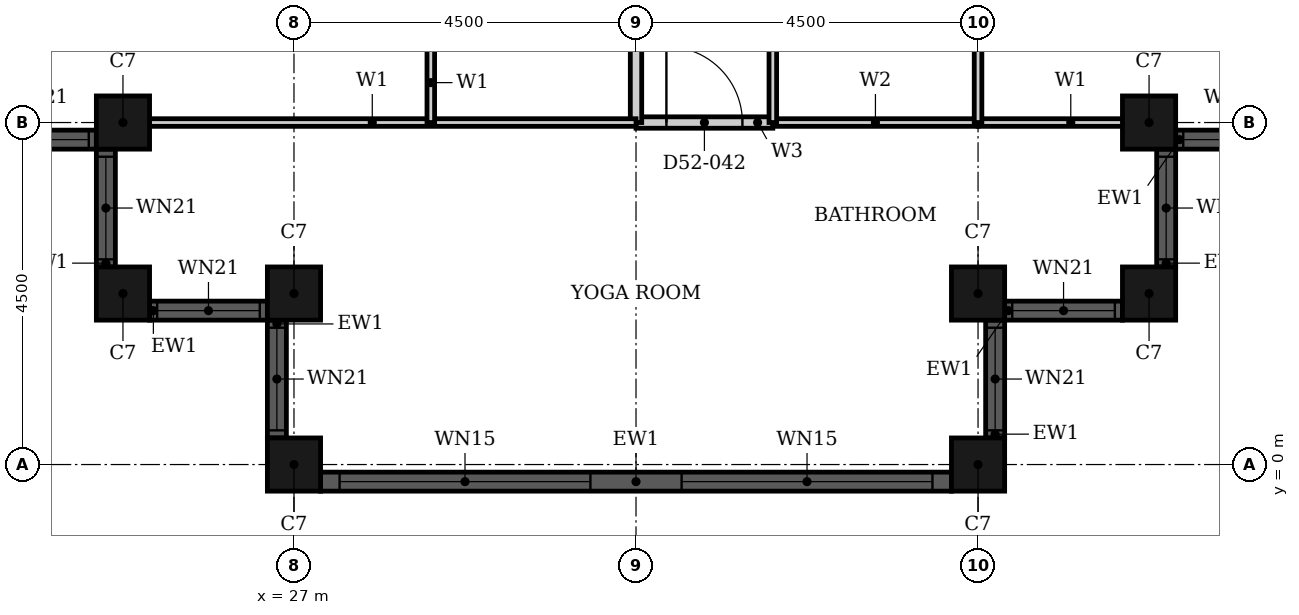
"""IFC4 building model, lengths in metres.
Left out: names, types, materials, properties, quantities, classifications, styles, units other than length and angle.
Written with IfcOpenShell. Run it as: python <this file> out.ifc"""

import sys

from ifc_helpers import new_model, si_unit, direction, frame, frame_2d, origin, origin_2d, place, context, subcontext, project, spatial, rectangle, hollow_rectangle, extrude, element, fill, save


model = new_model("IFC4")
c1 = context("Model", 3, precision=1e-05, world=origin(), true_north=direction((0.0, 1.0)))
c2 = subcontext(c1, "Body", "Model", "MODEL_VIEW")
j1 = project(units=[si_unit("LENGTHUNIT", "METRE"), si_unit("PLANEANGLEUNIT", "RADIAN")], contexts=[c1])
p1 = place(None, origin())
s1 = spatial("IfcSite", under=j1, at=p1, CompositionType="ELEMENT")
p2 = place(p1, origin())
s2 = spatial("IfcBuilding", under=s1, at=p2, CompositionType="ELEMENT")
p3 = place(p2, frame((0.0, 0.0, 207.2)))
s3 = spatial("IfcBuildingStorey", under=s2, at=p3, CompositionType="ELEMENT", Elevation=207.2)
for number, where, z_axis, x_axis in (
    (1, (24.75, 4.5, 0.0), (0.0, 0.0, 1.0), (1.0, 0.0, 0.0)),
    (2, (24.75, 2.25, 0.0), (0.0, 0.0, 1.0), (1.0, 0.0, 0.0)),
    (3, (27.0, 2.25, 0.0), (0.0, 0.0, 1.0), (1.0, 0.0, 0.0)),
    (4, (27.0, 0.0, 0.0), (0.0, 0.0, 1.0), (1.0, 0.0, 0.0)),
    (5, (36.0, 0.0, 0.0), (0.0, 0.0, 1.0), (1.0, 0.0, 0.0)),
    (6, (36.0, 2.25, 0.0), (0.0, 0.0, 1.0), (1.0, 0.0, 0.0)),
    (7, (38.25, 2.25, 0.0), (0.0, 0.0, 1.0), (1.0, 0.0, 0.0)),
    (8, (38.25, 4.5, 0.0), (0.0, 0.0, 1.0), (1.0, 0.0, 0.0)),
):
    element("IfcColumn", number, at=place(p3, frame(where, z_axis=z_axis, x_axis=x_axis)), inside=s3, PredefinedType="COLUMN", context=c2, shape_type="SweptSolid", body=[
        extrude(hollow_rectangle(XDim=0.7, YDim=0.7, WallThickness=0.022, at=origin_2d()), origin(), (0.0, 0.0, 1.0), 3.7),
    ])
p4 = place(p3, frame((22.85, 4.275, 0.0), z_axis=(0.0, 0.0, 1.0), x_axis=(1.0, 0.0, 0.0)))
e9 = element("IfcWall", 9, at=p4, inside=s3, PredefinedType="SOLIDWALL", context=c2, shape_type="SweptSolid", body=[
    extrude(rectangle(XDim=1.55, YDim=0.25, at=frame_2d((0.775, 0.0))), origin(), (0.0, 0.0, 1.0), 3.7),
])
p5 = place(p4, frame((0.1, 0.0, 0.9)))
e10 = element("IfcOpeningElement", 10, at=p5, cuts=e9, PredefinedType="OPENING", context=c2, shape_type="SweptSolid", body=[
    extrude(rectangle(XDim=1.35, YDim=1.85, at=frame_2d((0.675, 0.925))), frame((0.0, 0.135, 0.0), z_axis=(0.0, -1.0, 0.0), x_axis=(1.0, 0.0, 0.0)), (0.0, 0.0, 1.0), 0.27),
])
p6 = place(p3, frame((24.525, 4.15, 0.0), z_axis=(0.0, 0.0, 1.0), x_axis=(0.0, -1.0, 0.0)))
e11 = element("IfcWall", 11, at=p6, inside=s3, PredefinedType="SOLIDWALL", context=c2, shape_type="SweptSolid", body=[
    extrude(rectangle(XDim=1.55, YDim=0.25, at=frame_2d((0.775, 0.0))), origin(), (0.0, 0.0, 1.0), 3.7),
])
p7 = place(p6, frame((0.1, 0.0, 0.9)))
e12 = element("IfcOpeningElement", 12, at=p7, cuts=e11, PredefinedType="OPENING", context=c2, shape_type="SweptSolid", body=[
    extrude(rectangle(XDim=1.35, YDim=1.85, at=frame_2d((0.675, 0.925))), frame((0.0, 0.135, 0.0), z_axis=(0.0, -1.0, 0.0), x_axis=(1.0, 0.0, 0.0)), (0.0, 0.0, 1.0), 0.27),
])
p8 = place(p3, frame((25.1, 2.025, 0.0), z_axis=(0.0, 0.0, 1.0), x_axis=(1.0, 0.0, 0.0)))
e13 = element("IfcWall", 13, at=p8, inside=s3, PredefinedType="SOLIDWALL", context=c2, shape_type="SweptSolid", body=[
    extrude(rectangle(XDim=1.55, YDim=0.25, at=frame_2d((0.775, 0.0))), origin(), (0.0, 0.0, 1.0), 3.7),
])
p9 = place(p8, frame((0.1, 0.0, 0.9)))
e14 = element("IfcOpeningElement", 14, at=p9, cuts=e13, PredefinedType="OPENING", context=c2, shape_type="SweptSolid", body=[
    extrude(rectangle(XDim=1.35, YDim=1.85, at=frame_2d((0.675, 0.925))), frame((0.0, 0.135, 0.0), z_axis=(0.0, -1.0, 0.0), x_axis=(1.0, 0.0, 0.0)), (0.0, 0.0, 1.0), 0.27),
])
p10 = place(p3, frame((26.775, 1.9, 0.0), z_axis=(0.0, 0.0, 1.0), x_axis=(0.0, -1.0, 0.0)))
e15 = element("IfcWall", 15, at=p10, inside=s3, PredefinedType="SOLIDWALL", context=c2, shape_type="SweptSolid", body=[
    extrude(rectangle(XDim=1.55, YDim=0.25, at=frame_2d((0.775, 0.0))), origin(), (0.0, 0.0, 1.0), 3.7),
])
p11 = place(p10, frame((0.1, 0.0, 0.9)))
e16 = element("IfcOpeningElement", 16, at=p11, cuts=e15, PredefinedType="OPENING", context=c2, shape_type="SweptSolid", body=[
    extrude(rectangle(XDim=1.35, YDim=1.85, at=frame_2d((0.675, 0.925))), frame((0.0, 0.135, 0.0), z_axis=(0.0, -1.0, 0.0), x_axis=(1.0, 0.0, 0.0)), (0.0, 0.0, 1.0), 0.27),
])
p12 = place(p3, frame((27.35, -0.225, 0.0), z_axis=(0.0, 0.0, 1.0), x_axis=(1.0, 0.0, 0.0)))
e17 = element("IfcWall", 17, at=p12, inside=s3, PredefinedType="SOLIDWALL", context=c2, shape_type="SweptSolid", body=[
    extrude(rectangle(XDim=8.3, YDim=0.25, at=frame_2d((4.15, 0.0))), origin(), (0.0, 0.0, 1.0), 3.7),
])
p13 = place(p12, frame((0.25, 0.0, 0.45)))
e18 = element("IfcOpeningElement", 18, at=p13, cuts=e17, PredefinedType="OPENING", context=c2, shape_type="SweptSolid", body=[
    extrude(rectangle(XDim=3.3, YDim=2.3, at=frame_2d((1.65, 1.15))), frame((0.0, 0.135, 0.0), z_axis=(0.0, -1.0, 0.0), x_axis=(1.0, 0.0, 0.0)), (0.0, 0.0, 1.0), 0.27),
])
p14 = place(p12, frame((4.75, 0.0, 0.45)))
e19 = element("IfcOpeningElement", 19, at=p14, cuts=e17, PredefinedType="OPENING", context=c2, shape_type="SweptSolid", body=[
    extrude(rectangle(XDim=3.3, YDim=2.3, at=frame_2d((1.65, 1.15))), frame((0.0, 0.135, 0.0), z_axis=(0.0, -1.0, 0.0), x_axis=(1.0, 0.0, 0.0)), (0.0, 0.0, 1.0), 0.27),
])
p15 = place(p3, frame((36.225, 0.35, 0.0), z_axis=(0.0, 0.0, 1.0), x_axis=(0.0, 1.0, 0.0)))
e20 = element("IfcWall", 20, at=p15, inside=s3, PredefinedType="SOLIDWALL", context=c2, shape_type="SweptSolid", body=[
    extrude(rectangle(XDim=1.55, YDim=0.25, at=frame_2d((0.775, 0.0))), origin(), (0.0, 0.0, 1.0), 3.7),
])
p16 = place(p15, frame((0.1, 0.0, 0.9)))
e21 = element("IfcOpeningElement", 21, at=p16, cuts=e20, PredefinedType="OPENING", context=c2, shape_type="SweptSolid", body=[
    extrude(rectangle(XDim=1.35, YDim=1.85, at=frame_2d((0.675, 0.925))), frame((0.0, 0.135, 0.0), z_axis=(0.0, -1.0, 0.0), x_axis=(1.0, 0.0, 0.0)), (0.0, 0.0, 1.0), 0.27),
])
p17 = place(p3, frame((36.35, 2.025, 0.0), z_axis=(0.0, 0.0, 1.0), x_axis=(1.0, 0.0, 0.0)))
e22 = element("IfcWall", 22, at=p17, inside=s3, PredefinedType="SOLIDWALL", context=c2, shape_type="SweptSolid", body=[
    extrude(rectangle(XDim=1.55, YDim=0.25, at=frame_2d((0.775, 0.0))), origin(), (0.0, 0.0, 1.0), 3.7),
])
p18 = place(p17, frame((0.1, 0.0, 0.9)))
e23 = element("IfcOpeningElement", 23, at=p18, cuts=e22, PredefinedType="OPENING", context=c2, shape_type="SweptSolid", body=[
    extrude(rectangle(XDim=1.35, YDim=1.85, at=frame_2d((0.675, 0.925))), frame((0.0, 0.135, 0.0), z_axis=(0.0, -1.0, 0.0), x_axis=(1.0, 0.0, 0.0)), (0.0, 0.0, 1.0), 0.27),
])
p19 = place(p3, frame((38.475, 2.6, 0.0), z_axis=(0.0, 0.0, 1.0), x_axis=(0.0, 1.0, 0.0)))
e24 = element("IfcWall", 24, at=p19, inside=s3, PredefinedType="SOLIDWALL", context=c2, shape_type="SweptSolid", body=[
    extrude(rectangle(XDim=1.55, YDim=0.25, at=frame_2d((0.775, 0.0))), origin(), (0.0, 0.0, 1.0), 3.7),
])
p20 = place(p19, frame((0.1, 0.0, 0.9)))
e25 = element("IfcOpeningElement", 25, at=p20, cuts=e24, PredefinedType="OPENING", context=c2, shape_type="SweptSolid", body=[
    extrude(rectangle(XDim=1.35, YDim=1.85, at=frame_2d((0.675, 0.925))), frame((0.0, 0.135, 0.0), z_axis=(0.0, -1.0, 0.0), x_axis=(1.0, 0.0, 0.0)), (0.0, 0.0, 1.0), 0.27),
])
p21 = place(p3, frame((38.6, 4.275, 0.0), z_axis=(0.0, 0.0, 1.0), x_axis=(1.0, 0.0, 0.0)))
e26 = element("IfcWall", 26, at=p21, inside=s3, PredefinedType="SOLIDWALL", context=c2, shape_type="SweptSolid", body=[
    extrude(rectangle(XDim=1.55, YDim=0.25, at=frame_2d((0.775, 0.0))), origin(), (0.0, 0.0, 1.0), 3.7),
])
p22 = place(p21, frame((0.1, 0.0, 0.9)))
e27 = element("IfcOpeningElement", 27, at=p22, cuts=e26, PredefinedType="OPENING", context=c2, shape_type="SweptSolid", body=[
    extrude(rectangle(XDim=1.35, YDim=1.85, at=frame_2d((0.675, 0.925))), frame((0.0, 0.135, 0.0), z_axis=(0.0, -1.0, 0.0), x_axis=(1.0, 0.0, 0.0)), (0.0, 0.0, 1.0), 0.27),
])
p23 = place(p3, frame((31.5, 4.5, 0.0), z_axis=(0.0, 0.0, 1.0), x_axis=(1.0, 0.0, 0.0)))
e28 = element("IfcWall", 28, at=p23, inside=s3, PredefinedType="PARTITIONING", context=c2, shape_type="SweptSolid", body=[
    extrude(rectangle(XDim=1.8, YDim=0.15, at=frame_2d((0.9, 0.0))), origin(), (0.0, 0.0, 1.0), 3.4),
])
p24 = place(p23, frame((0.4, 0.0, 0.0)))
e29 = element("IfcOpeningElement", 29, at=p24, cuts=e28, PredefinedType="OPENING", context=c2, shape_type="SweptSolid", body=[
    extrude(rectangle(XDim=1.0, YDim=2.1, at=frame_2d((0.5, 1.05))), frame((0.0, 0.085, 0.0), z_axis=(0.0, -1.0, 0.0), x_axis=(1.0, 0.0, 0.0)), (0.0, 0.0, 1.0), 0.17),
])
p25 = place(p3, frame((31.5, 4.5, 0.0), z_axis=(0.0, 0.0, 1.0), x_axis=(0.0, 1.0, 0.0)))
e30 = element("IfcWall", 30, at=p25, inside=s3, PredefinedType="PARTITIONING", context=c2, shape_type="SweptSolid", body=[
    extrude(rectangle(XDim=6.6, YDim=0.15, at=frame_2d((3.3, 0.0))), origin(), (0.0, 0.0, 1.0), 2.68),
])
p26 = place(p25, frame((4.3, 0.0, 0.0)))
e31 = element("IfcOpeningElement", 31, at=p26, cuts=e30, PredefinedType="OPENING", context=c2, shape_type="SweptSolid", body=[
    extrude(rectangle(XDim=1.0, YDim=2.2, at=frame_2d((0.5, 1.1))), frame((0.0, 0.085, 0.0), z_axis=(0.0, -1.0, 0.0), x_axis=(1.0, 0.0, 0.0)), (0.0, 0.0, 1.0), 0.17),
])
p27 = place(p3, frame((36.0, 4.5, 0.0), z_axis=(0.0, 0.0, 1.0), x_axis=(1.0, 0.0, 0.0)))
e32 = element("IfcWall", 32, at=p27, inside=s3, PredefinedType="PARTITIONING", context=c2, shape_type="SweptSolid", body=[
    extrude(rectangle(XDim=2.44, YDim=0.1, at=frame_2d((1.22, 0.0))), origin(), (0.0, 0.0, 1.0), 3.4),
])
p28 = place(p3, frame((24.56, 4.5, 0.0), z_axis=(0.0, 0.0, 1.0), x_axis=(1.0, 0.0, 0.0)))
e33 = element("IfcWall", 33, at=p28, inside=s3, PredefinedType="PARTITIONING", context=c2, shape_type="SweptSolid", body=[
    extrude(rectangle(XDim=6.94, YDim=0.1, at=frame_2d((3.47, 0.0))), origin(), (0.0, 0.0, 1.0), 3.4),
])
p29 = place(p3, frame((28.8, 4.5, 0.0), z_axis=(0.0, 0.0, 1.0), x_axis=(0.0, 1.0, 0.0)))
e34 = element("IfcWall", 34, at=p29, inside=s3, PredefinedType="PARTITIONING", context=c2, shape_type="SweptSolid", body=[
    extrude(rectangle(XDim=3.0, YDim=0.1, at=frame_2d((1.5, 0.0))), origin(), (0.0, 0.0, 1.0), 3.4),
])
p30 = place(p29, frame((1.05, 0.0, 0.0)))
e35 = element("IfcOpeningElement", 35, at=p30, cuts=e34, PredefinedType="OPENING", context=c2, shape_type="SweptSolid", body=[
    extrude(rectangle(XDim=0.9, YDim=2.1, at=frame_2d((0.45, 1.05))), frame((0.0, 0.06, 0.0), z_axis=(0.0, -1.0, 0.0), x_axis=(1.0, 0.0, 0.0)), (0.0, 0.0, 1.0), 0.12),
])
p31 = place(p3, frame((33.3, 4.5, 0.0), z_axis=(0.0, 0.0, 1.0), x_axis=(1.0, 0.0, 0.0)))
e36 = element("IfcWall", 36, at=p31, inside=s3, PredefinedType="PARTITIONING", context=c2, shape_type="SweptSolid", body=[
    extrude(rectangle(XDim=2.7, YDim=0.1, at=frame_2d((1.35, 0.0))), origin(), (0.0, 0.0, 1.0), 3.4),
])
p32 = place(p3, frame((33.3, 4.5, 0.0), z_axis=(0.0, 0.0, 1.0), x_axis=(0.0, 1.0, 0.0)))
e37 = element("IfcWall", 37, at=p32, inside=s3, PredefinedType="PARTITIONING", context=c2, shape_type="SweptSolid", body=[
    extrude(rectangle(XDim=2.4, YDim=0.1, at=frame_2d((1.2, 0.0))), origin(), (0.0, 0.0, 1.0), 3.4),
])
p33 = place(p3, frame((36.0, 4.5, 0.0), z_axis=(0.0, 0.0, 1.0), x_axis=(0.0, 1.0, 0.0)))
e38 = element("IfcWall", 38, at=p33, inside=s3, PredefinedType="PARTITIONING", context=c2, shape_type="SweptSolid", body=[
    extrude(rectangle(XDim=2.4, YDim=0.1, at=frame_2d((1.2, 0.0))), origin(), (0.0, 0.0, 1.0), 2.68),
])
p34 = place(p5, origin())
e39 = element("IfcWindow", 39, at=p34, inside=s3, PartitioningType="SINGLE_PANEL", PredefinedType="WINDOW", context=c2, shape_type="SweptSolid", body=[
    extrude(rectangle(XDim=1.35, YDim=1.85, at=frame_2d((0.675, 0.925))), frame((0.0, 0.03, 0.0), z_axis=(0.0, -1.0, 0.0), x_axis=(1.0, 0.0, 0.0)), (0.0, 0.0, 1.0), 0.06),
])
fill(e10, e39)
p35 = place(p7, origin())
e40 = element("IfcWindow", 40, at=p35, inside=s3, PartitioningType="SINGLE_PANEL", PredefinedType="WINDOW", context=c2, shape_type="SweptSolid", body=[
    extrude(rectangle(XDim=1.35, YDim=1.85, at=frame_2d((0.675, 0.925))), frame((0.0, 0.03, 0.0), z_axis=(0.0, -1.0, 0.0), x_axis=(1.0, 0.0, 0.0)), (0.0, 0.0, 1.0), 0.06),
])
fill(e12, e40)
p36 = place(p9, origin())
e41 = element("IfcWindow", 41, at=p36, inside=s3, PartitioningType="SINGLE_PANEL", PredefinedType="WINDOW", context=c2, shape_type="SweptSolid", body=[
    extrude(rectangle(XDim=1.35, YDim=1.85, at=frame_2d((0.675, 0.925))), frame((0.0, 0.03, 0.0), z_axis=(0.0, -1.0, 0.0), x_axis=(1.0, 0.0, 0.0)), (0.0, 0.0, 1.0), 0.06),
])
fill(e14, e41)
p37 = place(p11, origin())
e42 = element("IfcWindow", 42, at=p37, inside=s3, PartitioningType="SINGLE_PANEL", PredefinedType="WINDOW", context=c2, shape_type="SweptSolid", body=[
    extrude(rectangle(XDim=1.35, YDim=1.85, at=frame_2d((0.675, 0.925))), frame((0.0, 0.03, 0.0), z_axis=(0.0, -1.0, 0.0), x_axis=(1.0, 0.0, 0.0)), (0.0, 0.0, 1.0), 0.06),
])
fill(e16, e42)
p38 = place(p13, origin())
e43 = element("IfcWindow", 43, at=p38, inside=s3, PartitioningType="SINGLE_PANEL", PredefinedType="WINDOW", context=c2, shape_type="SweptSolid", body=[
    extrude(rectangle(XDim=3.3, YDim=2.3, at=frame_2d((1.65, 1.15))), frame((0.0, 0.03, 0.0), z_axis=(0.0, -1.0, 0.0), x_axis=(1.0, 0.0, 0.0)), (0.0, 0.0, 1.0), 0.06),
])
fill(e18, e43)
p39 = place(p14, origin())
e44 = element("IfcWindow", 44, at=p39, inside=s3, PartitioningType="SINGLE_PANEL", PredefinedType="WINDOW", context=c2, shape_type="SweptSolid", body=[
    extrude(rectangle(XDim=3.3, YDim=2.3, at=frame_2d((1.65, 1.15))), frame((0.0, 0.03, 0.0), z_axis=(0.0, -1.0, 0.0), x_axis=(1.0, 0.0, 0.0)), (0.0, 0.0, 1.0), 0.06),
])
fill(e19, e44)
p40 = place(p16, origin())
e45 = element("IfcWindow", 45, at=p40, inside=s3, PartitioningType="SINGLE_PANEL", PredefinedType="WINDOW", context=c2, shape_type="SweptSolid", body=[
    extrude(rectangle(XDim=1.35, YDim=1.85, at=frame_2d((0.675, 0.925))), frame((0.0, 0.03, 0.0), z_axis=(0.0, -1.0, 0.0), x_axis=(1.0, 0.0, 0.0)), (0.0, 0.0, 1.0), 0.06),
])
fill(e21, e45)
p41 = place(p18, origin())
e46 = element("IfcWindow", 46, at=p41, inside=s3, PartitioningType="SINGLE_PANEL", PredefinedType="WINDOW", context=c2, shape_type="SweptSolid", body=[
    extrude(rectangle(XDim=1.35, YDim=1.85, at=frame_2d((0.675, 0.925))), frame((0.0, 0.03, 0.0), z_axis=(0.0, -1.0, 0.0), x_axis=(1.0, 0.0, 0.0)), (0.0, 0.0, 1.0), 0.06),
])
fill(e23, e46)
p42 = place(p20, origin())
e47 = element("IfcWindow", 47, at=p42, inside=s3, PartitioningType="SINGLE_PANEL", PredefinedType="WINDOW", context=c2, shape_type="SweptSolid", body=[
    extrude(rectangle(XDim=1.35, YDim=1.85, at=frame_2d((0.675, 0.925))), frame((0.0, 0.03, 0.0), z_axis=(0.0, -1.0, 0.0), x_axis=(1.0, 0.0, 0.0)), (0.0, 0.0, 1.0), 0.06),
])
fill(e25, e47)
p43 = place(p22, origin())
e48 = element("IfcWindow", 48, at=p43, inside=s3, PartitioningType="SINGLE_PANEL", PredefinedType="WINDOW", context=c2, shape_type="SweptSolid", body=[
    extrude(rectangle(XDim=1.35, YDim=1.85, at=frame_2d((0.675, 0.925))), frame((0.0, 0.03, 0.0), z_axis=(0.0, -1.0, 0.0), x_axis=(1.0, 0.0, 0.0)), (0.0, 0.0, 1.0), 0.06),
])
fill(e27, e48)
p44 = place(p24, origin())
e49 = element("IfcDoor", 49, at=p44, inside=s3, OperationType="SINGLE_SWING_RIGHT", PredefinedType="DOOR", context=c2, shape_type="SweptSolid", body=[
    extrude(rectangle(XDim=1.0, YDim=2.1, at=frame_2d((0.5, 1.05))), frame((0.0, 0.025, 0.0), z_axis=(0.0, -1.0, 0.0), x_axis=(1.0, 0.0, 0.0)), (0.0, 0.0, 1.0), 0.05),
])
fill(e29, e49)
save(model, sys.argv[1])
